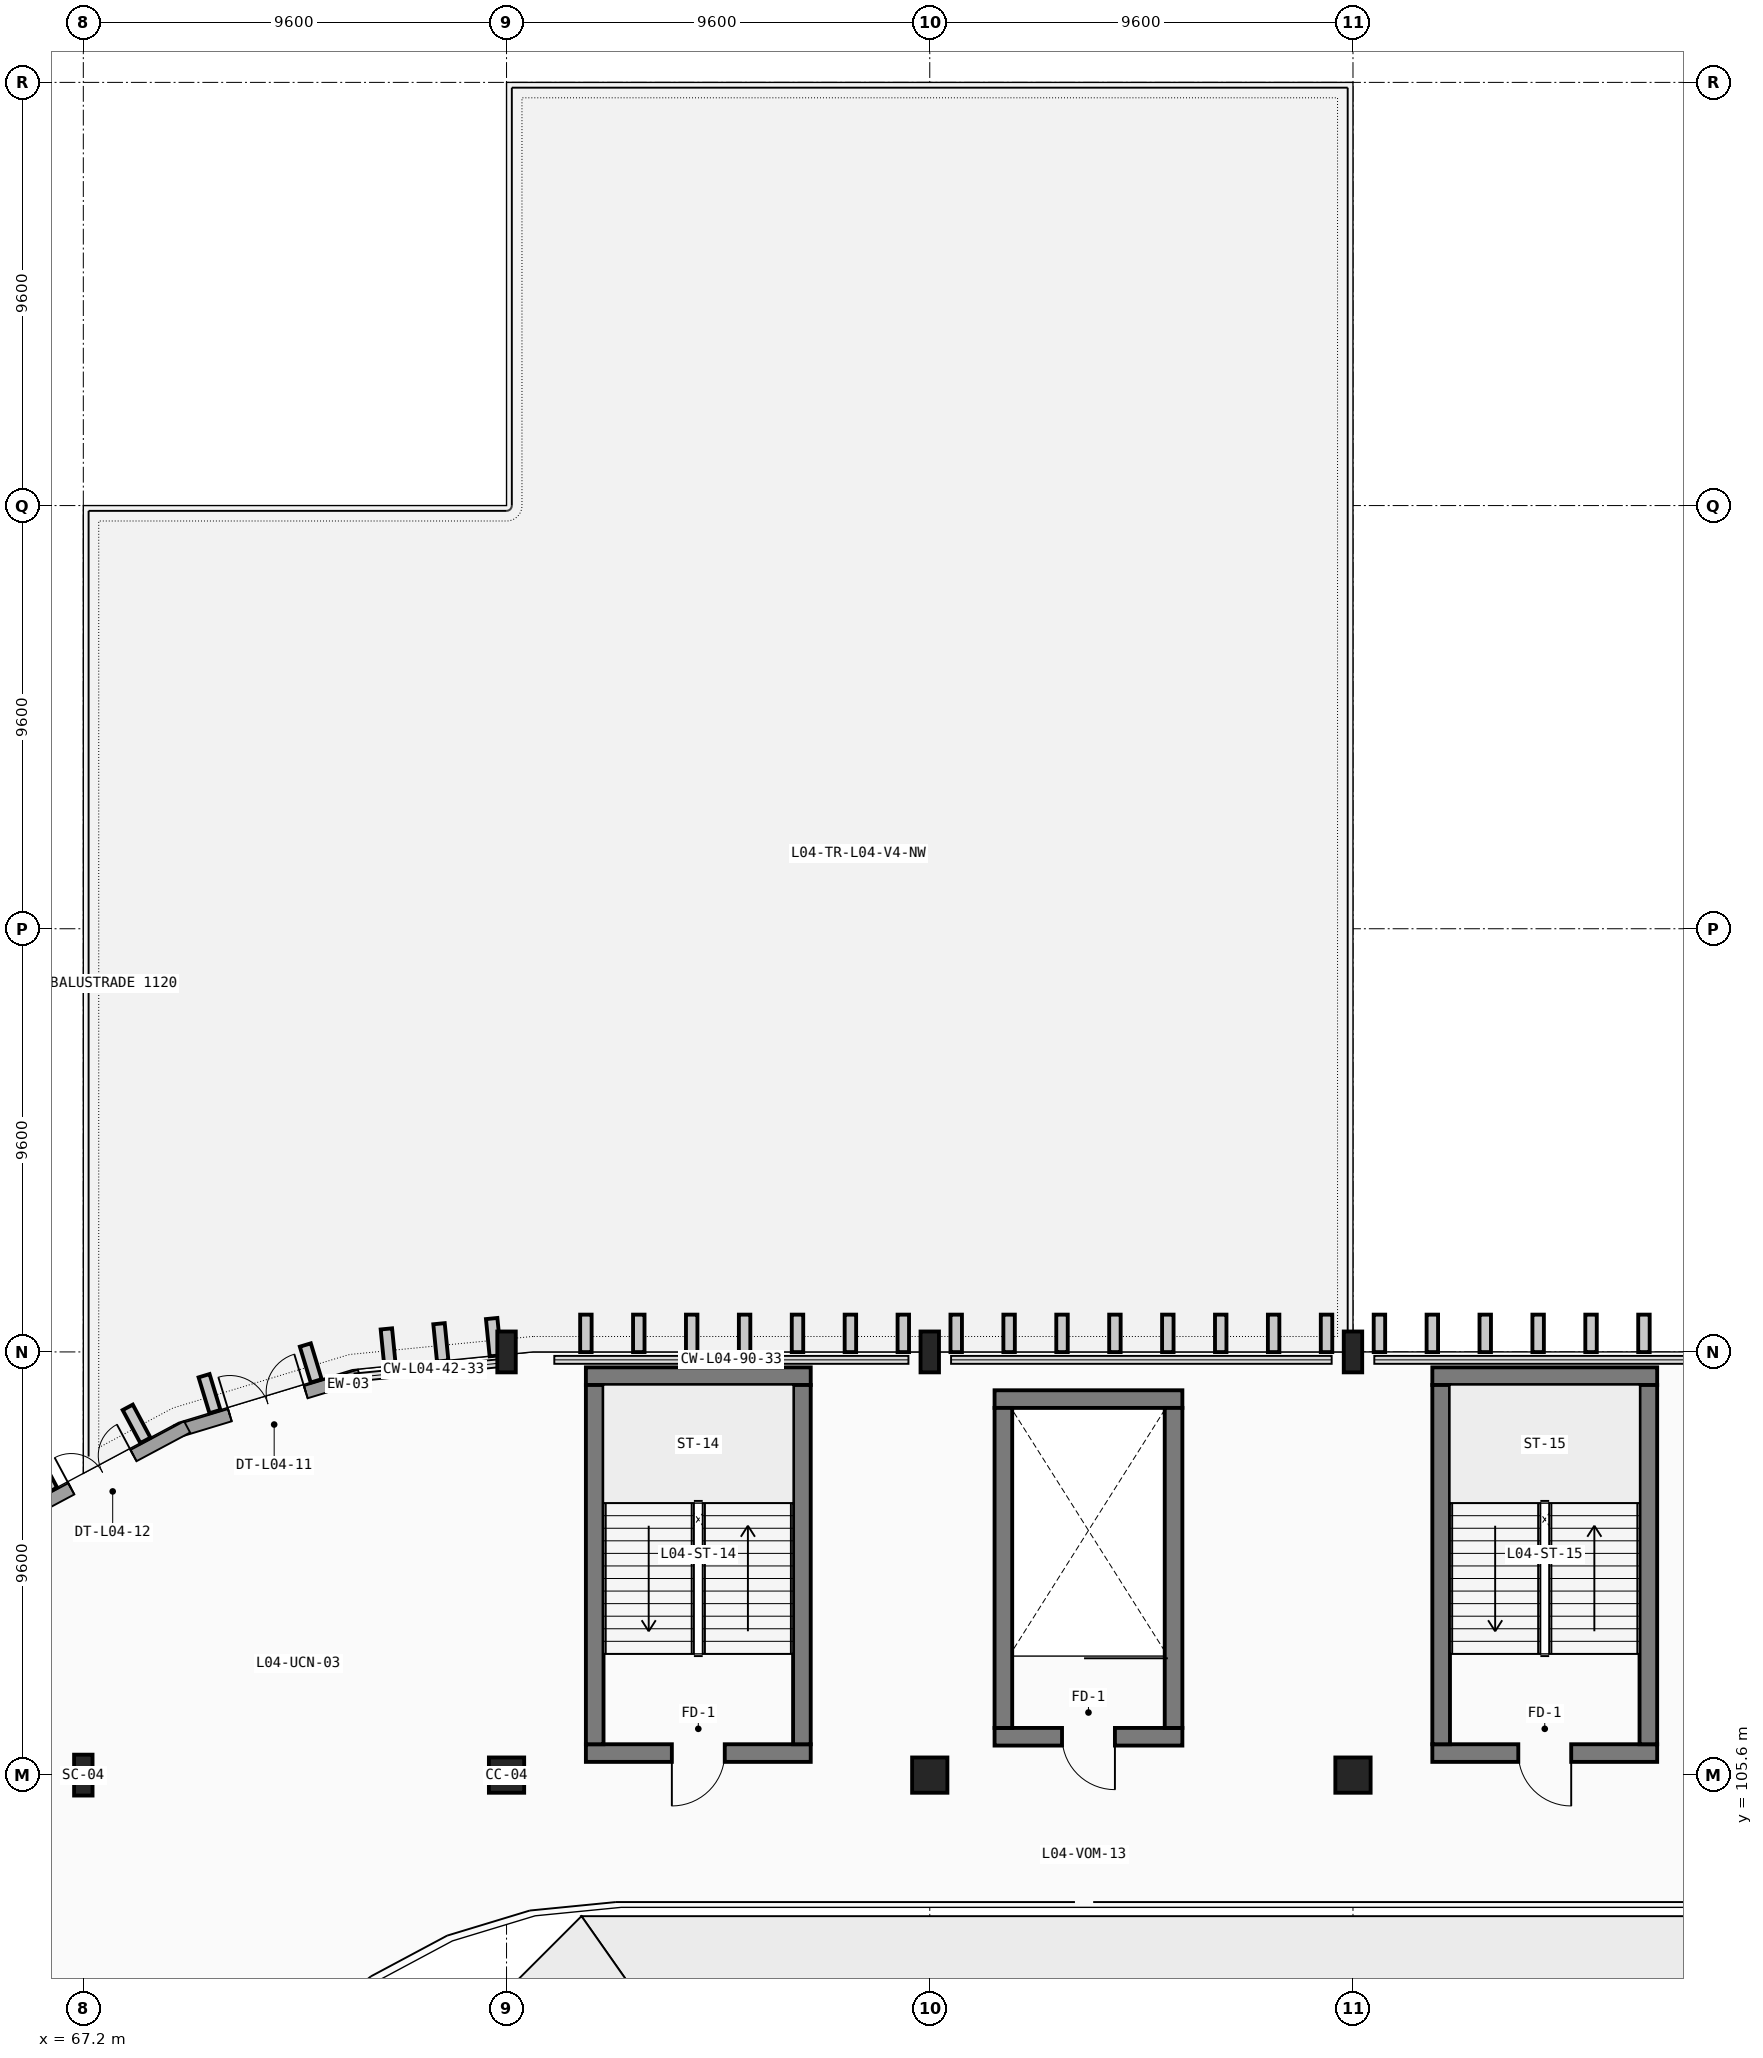
"""IFC4 building model, lengths in metres.
Left out: names, types, materials, properties, quantities, classifications, styles, units other than length and angle.
Written with IfcOpenShell. Run it as: python <this file> out.ifc"""

import sys

from ifc_helpers import new_model, si_unit, direction, frame, frame_2d, origin, origin_2d, place, context, subcontext, project, spatial, rectangle, i_section, extrude, element, fill, save


model = new_model("IFC4")
c1 = context("Model", 3, precision=1e-05, world=origin(), true_north=direction((0.0, 1.0)))
c2 = subcontext(c1, "Body", "Model", "MODEL_VIEW")
j1 = project(units=[si_unit("LENGTHUNIT", "METRE"), si_unit("PLANEANGLEUNIT", "RADIAN")], contexts=[c1])
p1 = place(None, origin())
s1 = spatial("IfcSite", under=j1, at=p1, CompositionType="ELEMENT")
p2 = place(p1, origin())
s2 = spatial("IfcBuilding", under=s1, at=p2, CompositionType="ELEMENT")
p3 = place(p2, frame((0.0, 0.0, 18.6)))
s3 = spatial("IfcBuildingStorey", under=s2, at=p3, CompositionType="ELEMENT", Elevation=18.6)
p4 = place(p3, frame((67.2, 105.6, 0.0), z_axis=(0.0, 0.0, 1.0), x_axis=(1.0, 0.0, 0.0)))
e1 = element("IfcColumn", 1, at=p4, inside=s3, PredefinedType="COLUMN", context=c2, shape_type="SweptSolid", body=[
    extrude(i_section(OverallWidth=0.418, OverallDepth=0.927, WebThickness=0.019, FlangeThickness=0.032, FilletRadius=0.024, at=origin_2d()), origin(), (0.0, 0.0, 1.0), 4.5),
])
p5 = place(p3, frame((76.8, 105.6, 0.0), z_axis=(0.0, 0.0, 1.0), x_axis=(1.0, 0.0, 0.0)))
e2 = element("IfcColumn", 2, at=p5, inside=s3, PredefinedType="COLUMN", context=c2, shape_type="SweptSolid", body=[
    extrude(rectangle(XDim=0.8, YDim=0.8, at=origin_2d()), origin(), (0.0, 0.0, 1.0), 4.5),
])
p6 = place(p3, frame((76.8, 115.2, 0.0), z_axis=(0.0, 0.0, 1.0), x_axis=(1.0, 0.0, 0.0)))
e3 = element("IfcColumn", 3, at=p6, inside=s3, PredefinedType="COLUMN", context=c2, shape_type="SweptSolid", body=[
    extrude(i_section(OverallWidth=0.418, OverallDepth=0.927, WebThickness=0.019, FlangeThickness=0.032, FilletRadius=0.024, at=origin_2d()), origin(), (0.0, 0.0, 1.0), 4.5),
])
p7 = place(p3, frame((86.4, 105.6, 0.0), z_axis=(0.0, 0.0, 1.0), x_axis=(1.0, 0.0, 0.0)))
e4 = element("IfcColumn", 4, at=p7, inside=s3, PredefinedType="COLUMN", context=c2, shape_type="SweptSolid", body=[
    extrude(rectangle(XDim=0.8, YDim=0.8, at=origin_2d()), origin(), (0.0, 0.0, 1.0), 4.5),
])
p8 = place(p3, frame((86.4, 115.2, 0.0), z_axis=(0.0, 0.0, 1.0), x_axis=(1.0, 0.0, 0.0)))
e5 = element("IfcColumn", 5, at=p8, inside=s3, PredefinedType="COLUMN", context=c2, shape_type="SweptSolid", body=[
    extrude(i_section(OverallWidth=0.418, OverallDepth=0.927, WebThickness=0.019, FlangeThickness=0.032, FilletRadius=0.024, at=origin_2d()), origin(), (0.0, 0.0, 1.0), 4.5),
])
p9 = place(p3, frame((96.0, 105.6, 0.0), z_axis=(0.0, 0.0, 1.0), x_axis=(1.0, 0.0, 0.0)))
e6 = element("IfcColumn", 6, at=p9, inside=s3, PredefinedType="COLUMN", context=c2, shape_type="SweptSolid", body=[
    extrude(rectangle(XDim=0.8, YDim=0.8, at=origin_2d()), origin(), (0.0, 0.0, 1.0), 4.5),
])
p10 = place(p3, frame((96.0, 115.2, 0.0), z_axis=(0.0, 0.0, 1.0), x_axis=(1.0, 0.0, 0.0)))
e7 = element("IfcColumn", 7, at=p10, inside=s3, PredefinedType="COLUMN", context=c2, shape_type="SweptSolid", body=[
    extrude(i_section(OverallWidth=0.418, OverallDepth=0.927, WebThickness=0.019, FlangeThickness=0.032, FilletRadius=0.024, at=origin_2d()), origin(), (0.0, 0.0, 1.0), 4.5),
])
p11 = place(p3, frame((73.47, 114.659, 0.0), z_axis=(0.0, 0.0, 1.0), x_axis=(-0.956928680947, -0.290323095156, 0.0)))
e8 = element("IfcWall", 8, at=p11, inside=s3, PredefinedType="SOLIDWALL", context=c2, shape_type="SweptSolid", body=[
    extrude(rectangle(XDim=4.357, YDim=0.29, at=frame_2d((2.178, 0.0))), origin(), (0.0, 0.0, 1.0), 4.24),
])
p12 = place(p11, frame((3.078, 0.0, 0.0), z_axis=(0.0, 0.0, 1.0), x_axis=(-1.0, 0.0, 0.0)))
e9 = element("IfcOpeningElement", 9, at=p12, cuts=e8, PredefinedType="OPENING", context=c2, shape_type="SweptSolid", body=[
    extrude(rectangle(XDim=1.8, YDim=2.3, at=frame_2d((0.9, 1.15))), frame((0.0, 0.155, 0.0), z_axis=(0.0, -1.0, 0.0), x_axis=(1.0, 0.0, 0.0)), (0.0, 0.0, 1.0), 0.31),
])
p13 = place(p3, frame((69.554, 113.499, 0.0), z_axis=(0.0, 0.0, 1.0), x_axis=(-0.881924438709, -0.471390797968, 0.0)))
e10 = element("IfcWall", 10, at=p13, inside=s3, PredefinedType="SOLIDWALL", context=c2, shape_type="SweptSolid", body=[
    extrude(rectangle(XDim=4.357, YDim=0.29, at=frame_2d((2.178, 0.0))), origin(), (0.0, 0.0, 1.0), 4.24),
])
p14 = place(p13, frame((2.979, 0.0, 0.0), z_axis=(0.0, 0.0, 1.0), x_axis=(-1.0, 0.0, 0.0)))
e11 = element("IfcOpeningElement", 11, at=p14, cuts=e10, PredefinedType="OPENING", context=c2, shape_type="SweptSolid", body=[
    extrude(rectangle(XDim=1.6, YDim=2.25, at=frame_2d((0.8, 1.125))), frame((0.0, 0.155, 0.0), z_axis=(0.0, -1.0, 0.0), x_axis=(1.0, 0.0, 0.0)), (0.0, 0.0, 1.0), 0.31),
])
p15 = place(p3, frame((78.6, 106.1, 0.0), z_axis=(0.0, 0.0, 1.0), x_axis=(1.0, 0.0, 0.0)))
e12 = element("IfcWall", 12, at=p15, inside=s3, PredefinedType="SHEAR", context=c2, shape_type="SweptSolid", body=[
    extrude(rectangle(XDim=5.1, YDim=0.4, at=frame_2d((2.55, 0.0))), origin(), (0.0, 0.0, 1.0), 4.24),
])
p16 = place(p15, frame((3.15, 0.0, 0.0), z_axis=(0.0, 0.0, 1.0), x_axis=(-1.0, 0.0, 0.0)))
e13 = element("IfcOpeningElement", 13, at=p16, cuts=e12, PredefinedType="OPENING", context=c2, shape_type="SweptSolid", body=[
    extrude(rectangle(XDim=1.2, YDim=2.2, at=frame_2d((0.6, 1.1))), frame((0.0, 0.21, 0.0), z_axis=(0.0, -1.0, 0.0), x_axis=(1.0, 0.0, 0.0)), (0.0, 0.0, 1.0), 0.42),
])
p17 = place(p3, frame((83.7, 114.65, 0.0), z_axis=(0.0, 0.0, 1.0), x_axis=(-1.0, 0.0, 0.0)))
e14 = element("IfcWall", 14, at=p17, inside=s3, PredefinedType="SHEAR", context=c2, shape_type="SweptSolid", body=[
    extrude(rectangle(XDim=5.1, YDim=0.4, at=frame_2d((2.55, 0.0))), origin(), (0.0, 0.0, 1.0), 4.24),
])
for number, where, z_axis, x_axis in (
    (15, (78.8, 114.45, 0.0), (0.0, 0.0, 1.0), (0.0, -1.0, 0.0)),
    (16, (83.5, 106.3, 0.0), (0.0, 0.0, 1.0), (0.0, 1.0, 0.0)),
):
    element("IfcWall", number, at=place(p3, frame(where, z_axis=z_axis, x_axis=x_axis)), inside=s3, PredefinedType="SHEAR", context=c2, shape_type="SweptSolid", body=[
        extrude(rectangle(XDim=8.15, YDim=0.4, at=frame_2d((4.075, 0.0))), origin(), (0.0, 0.0, 1.0), 4.24),
    ])
p18 = place(p3, frame((97.8, 106.1, 0.0), z_axis=(0.0, 0.0, 1.0), x_axis=(1.0, 0.0, 0.0)))
e17 = element("IfcWall", 17, at=p18, inside=s3, PredefinedType="SHEAR", context=c2, shape_type="SweptSolid", body=[
    extrude(rectangle(XDim=5.1, YDim=0.4, at=frame_2d((2.55, 0.0))), origin(), (0.0, 0.0, 1.0), 4.24),
])
p19 = place(p18, frame((3.15, 0.0, 0.0), z_axis=(0.0, 0.0, 1.0), x_axis=(-1.0, 0.0, 0.0)))
e18 = element("IfcOpeningElement", 18, at=p19, cuts=e17, PredefinedType="OPENING", context=c2, shape_type="SweptSolid", body=[
    extrude(rectangle(XDim=1.2, YDim=2.2, at=frame_2d((0.6, 1.1))), frame((0.0, 0.21, 0.0), z_axis=(0.0, -1.0, 0.0), x_axis=(1.0, 0.0, 0.0)), (0.0, 0.0, 1.0), 0.42),
])
p20 = place(p3, frame((102.9, 114.65, 0.0), z_axis=(0.0, 0.0, 1.0), x_axis=(-1.0, 0.0, 0.0)))
e19 = element("IfcWall", 19, at=p20, inside=s3, PredefinedType="SHEAR", context=c2, shape_type="SweptSolid", body=[
    extrude(rectangle(XDim=5.1, YDim=0.4, at=frame_2d((2.55, 0.0))), origin(), (0.0, 0.0, 1.0), 4.24),
])
for number, where, z_axis, x_axis in (
    (20, (98.0, 114.45, 0.0), (0.0, 0.0, 1.0), (0.0, -1.0, 0.0)),
    (21, (102.7, 106.3, 0.0), (0.0, 0.0, 1.0), (0.0, 1.0, 0.0)),
):
    element("IfcWall", number, at=place(p3, frame(where, z_axis=z_axis, x_axis=x_axis)), inside=s3, PredefinedType="SHEAR", context=c2, shape_type="SweptSolid", body=[
        extrude(rectangle(XDim=8.15, YDim=0.4, at=frame_2d((4.075, 0.0))), origin(), (0.0, 0.0, 1.0), 4.24),
    ])
p21 = place(p3, frame((87.87, 106.47, 0.0), z_axis=(0.0, 0.0, 1.0), x_axis=(1.0, 0.0, 0.0)))
e22 = element("IfcWall", 22, at=p21, inside=s3, PredefinedType="SHEAR", context=c2, shape_type="SweptSolid", body=[
    extrude(rectangle(XDim=4.26, YDim=0.4, at=frame_2d((2.13, 0.0))), origin(), (0.0, 0.0, 1.0), 4.24),
])
p22 = place(p21, frame((2.73, 0.0, 0.0), z_axis=(0.0, 0.0, 1.0), x_axis=(-1.0, 0.0, 0.0)))
e23 = element("IfcOpeningElement", 23, at=p22, cuts=e22, PredefinedType="OPENING", context=c2, shape_type="SweptSolid", body=[
    extrude(rectangle(XDim=1.2, YDim=2.2, at=frame_2d((0.6, 1.1))), frame((0.0, 0.21, 0.0), z_axis=(0.0, -1.0, 0.0), x_axis=(1.0, 0.0, 0.0)), (0.0, 0.0, 1.0), 0.42),
])
p23 = place(p3, frame((92.13, 114.13, 0.0), z_axis=(0.0, 0.0, 1.0), x_axis=(-1.0, 0.0, 0.0)))
e24 = element("IfcWall", 24, at=p23, inside=s3, PredefinedType="SHEAR", context=c2, shape_type="SweptSolid", body=[
    extrude(rectangle(XDim=4.26, YDim=0.4, at=frame_2d((2.13, 0.0))), origin(), (0.0, 0.0, 1.0), 4.24),
])
for number, where, z_axis, x_axis in (
    (25, (88.07, 113.93, 0.0), (0.0, 0.0, 1.0), (0.0, -1.0, 0.0)),
    (26, (91.93, 106.67, 0.0), (0.0, 0.0, 1.0), (0.0, 1.0, 0.0)),
):
    element("IfcWall", number, at=place(p3, frame(where, z_axis=z_axis, x_axis=x_axis)), inside=s3, PredefinedType="SHEAR", context=c2, shape_type="SweptSolid", body=[
        extrude(rectangle(XDim=7.26, YDim=0.4, at=frame_2d((3.63, 0.0))), origin(), (0.0, 0.0, 1.0), 4.24),
    ])
p24 = place(p12, origin())
e27 = element("IfcDoor", 27, at=p24, inside=s3, OperationType="DOUBLE_DOOR_SINGLE_SWING", PredefinedType="DOOR", context=c2, shape_type="SweptSolid", body=[
    extrude(rectangle(XDim=1.8, YDim=2.3, at=frame_2d((0.9, 1.15))), frame((0.0, 0.025, 0.0), z_axis=(0.0, -1.0, 0.0), x_axis=(1.0, 0.0, 0.0)), (0.0, 0.0, 1.0), 0.05),
])
fill(e9, e27)
p25 = place(p14, origin())
e28 = element("IfcDoor", 28, at=p25, inside=s3, OperationType="DOUBLE_DOOR_SINGLE_SWING", PredefinedType="DOOR", context=c2, shape_type="SweptSolid", body=[
    extrude(rectangle(XDim=1.6, YDim=2.25, at=frame_2d((0.8, 1.125))), frame((0.0, 0.025, 0.0), z_axis=(0.0, -1.0, 0.0), x_axis=(1.0, 0.0, 0.0)), (0.0, 0.0, 1.0), 0.05),
])
fill(e11, e28)
p26 = place(p16, origin())
e29 = element("IfcDoor", 29, at=p26, inside=s3, OperationType="SINGLE_SWING_RIGHT", PredefinedType="DOOR", context=c2, shape_type="SweptSolid", body=[
    extrude(rectangle(XDim=1.2, YDim=2.2, at=frame_2d((0.6, 1.1))), frame((0.0, 0.025, 0.0), z_axis=(0.0, -1.0, 0.0), x_axis=(1.0, 0.0, 0.0)), (0.0, 0.0, 1.0), 0.05),
])
fill(e13, e29)
p27 = place(p19, origin())
e30 = element("IfcDoor", 30, at=p27, inside=s3, OperationType="SINGLE_SWING_LEFT", PredefinedType="DOOR", context=c2, shape_type="SweptSolid", body=[
    extrude(rectangle(XDim=1.2, YDim=2.2, at=frame_2d((0.6, 1.1))), frame((0.0, 0.025, 0.0), z_axis=(0.0, -1.0, 0.0), x_axis=(1.0, 0.0, 0.0)), (0.0, 0.0, 1.0), 0.05),
])
fill(e18, e30)
p28 = place(p22, origin())
e31 = element("IfcDoor", 31, at=p28, inside=s3, OperationType="SINGLE_SWING_LEFT", PredefinedType="DOOR", context=c2, shape_type="SweptSolid", body=[
    extrude(rectangle(XDim=1.2, YDim=2.2, at=frame_2d((0.6, 1.1))), frame((0.0, 0.025, 0.0), z_axis=(0.0, -1.0, 0.0), x_axis=(1.0, 0.0, 0.0)), (0.0, 0.0, 1.0), 0.05),
])
fill(e23, e31)
save(model, sys.argv[1])
